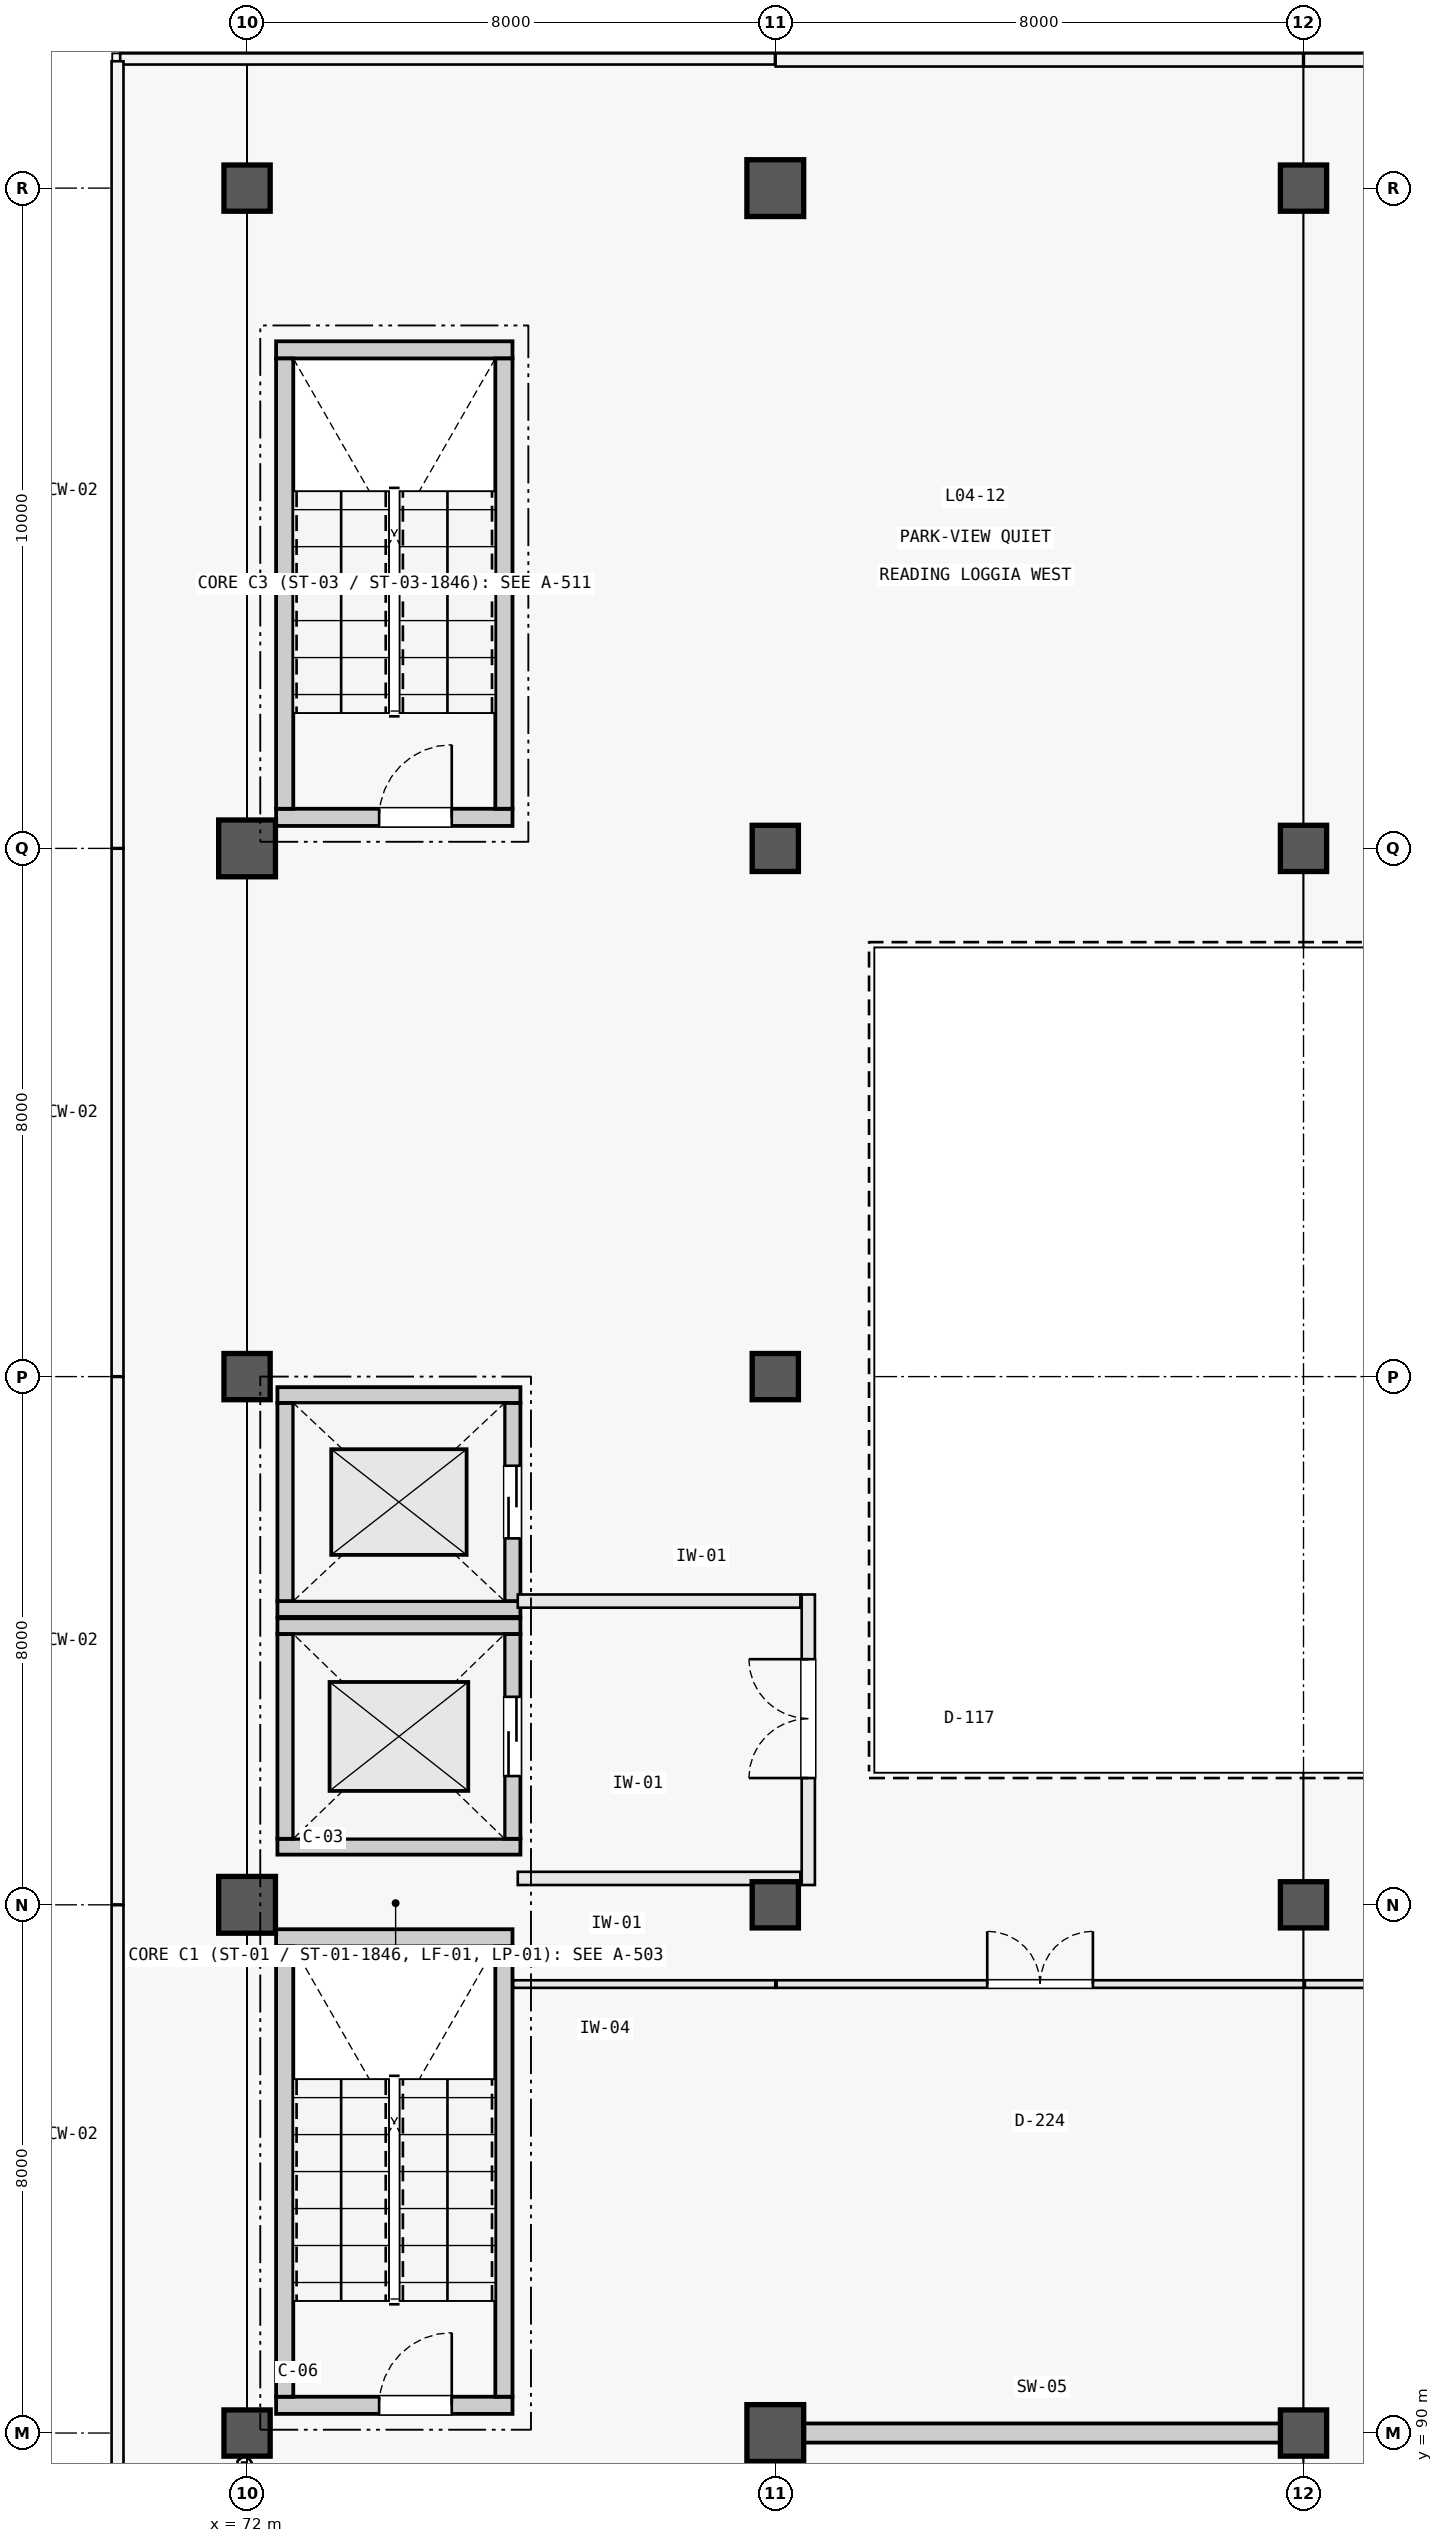
"""IFC4 building model, lengths in metres.
Left out: names, types, materials, properties, quantities, classifications, styles, units other than length and angle.
Written with IfcOpenShell. Run it as: python <this file> out.ifc"""

import sys

from ifc_helpers import new_model, si_unit, direction, frame, frame_2d, origin, origin_2d, place, context, subcontext, project, spatial, rectangle, extrude, element, fill, save


model = new_model("IFC4")
c1 = context("Model", 3, precision=1e-05, world=origin(), true_north=direction((0.0, 1.0)))
c2 = subcontext(c1, "Body", "Model", "MODEL_VIEW")
j1 = project(units=[si_unit("LENGTHUNIT", "METRE"), si_unit("PLANEANGLEUNIT", "RADIAN")], contexts=[c1])
p1 = place(None, origin())
s1 = spatial("IfcSite", under=j1, at=p1, CompositionType="ELEMENT")
p2 = place(p1, origin())
s2 = spatial("IfcBuilding", under=s1, at=p2, CompositionType="ELEMENT")
p3 = place(p2, frame((0.0, 0.0, 15.3)))
s3 = spatial("IfcBuildingStorey", under=s2, at=p3, CompositionType="ELEMENT", Elevation=15.3)
p4 = place(p3, frame((72.0, 90.0, 0.0), z_axis=(0.0, 0.0, 1.0), x_axis=(1.0, 0.0, 0.0)))
e1 = element("IfcColumn", 1, at=p4, inside=s3, PredefinedType="COLUMN", context=c2, shape_type="SweptSolid", body=[
    extrude(rectangle(XDim=0.7, YDim=0.7, at=origin_2d()), origin(), (0.0, 0.0, 1.0), 4.8),
])
p5 = place(p3, frame((72.0, 98.0, 0.0), z_axis=(0.0, 0.0, 1.0), x_axis=(1.0, 0.0, 0.0)))
e2 = element("IfcColumn", 2, at=p5, inside=s3, PredefinedType="COLUMN", context=c2, shape_type="SweptSolid", body=[
    extrude(rectangle(XDim=0.86, YDim=0.86, at=origin_2d()), origin(), (0.0, 0.0, 1.0), 4.8),
])
p6 = place(p3, frame((72.0, 106.0, 0.0), z_axis=(0.0, 0.0, 1.0), x_axis=(1.0, 0.0, 0.0)))
e3 = element("IfcColumn", 3, at=p6, inside=s3, PredefinedType="COLUMN", context=c2, shape_type="SweptSolid", body=[
    extrude(rectangle(XDim=0.7, YDim=0.7, at=origin_2d()), origin(), (0.0, 0.0, 1.0), 4.8),
])
p7 = place(p3, frame((72.0, 114.0, 0.0), z_axis=(0.0, 0.0, 1.0), x_axis=(1.0, 0.0, 0.0)))
e4 = element("IfcColumn", 4, at=p7, inside=s3, PredefinedType="COLUMN", context=c2, shape_type="SweptSolid", body=[
    extrude(rectangle(XDim=0.86, YDim=0.86, at=origin_2d()), origin(), (0.0, 0.0, 1.0), 4.8),
])
p8 = place(p3, frame((72.0, 124.0, 0.0), z_axis=(0.0, 0.0, 1.0), x_axis=(1.0, 0.0, 0.0)))
e5 = element("IfcColumn", 5, at=p8, inside=s3, PredefinedType="COLUMN", context=c2, shape_type="SweptSolid", body=[
    extrude(rectangle(XDim=0.7, YDim=0.7, at=origin_2d()), origin(), (0.0, 0.0, 1.0), 4.8),
])
p9 = place(p3, frame((80.0, 90.0, 0.0), z_axis=(0.0, 0.0, 1.0), x_axis=(1.0, 0.0, 0.0)))
e6 = element("IfcColumn", 6, at=p9, inside=s3, PredefinedType="COLUMN", context=c2, shape_type="SweptSolid", body=[
    extrude(rectangle(XDim=0.86, YDim=0.86, at=origin_2d()), origin(), (0.0, 0.0, 1.0), 4.8),
])
for number, where, z_axis, x_axis in (
    (7, (80.0, 98.0, 0.0), (0.0, 0.0, 1.0), (1.0, 0.0, 0.0)),
    (8, (80.0, 106.0, 0.0), (0.0, 0.0, 1.0), (1.0, 0.0, 0.0)),
    (9, (80.0, 114.0, 0.0), (0.0, 0.0, 1.0), (1.0, 0.0, 0.0)),
):
    element("IfcColumn", number, at=place(p3, frame(where, z_axis=z_axis, x_axis=x_axis)), inside=s3, PredefinedType="COLUMN", context=c2, shape_type="SweptSolid", body=[
        extrude(rectangle(XDim=0.7, YDim=0.7, at=origin_2d()), origin(), (0.0, 0.0, 1.0), 4.8),
    ])
p10 = place(p3, frame((80.0, 124.0, 0.0), z_axis=(0.0, 0.0, 1.0), x_axis=(1.0, 0.0, 0.0)))
e10 = element("IfcColumn", 10, at=p10, inside=s3, PredefinedType="COLUMN", context=c2, shape_type="SweptSolid", body=[
    extrude(rectangle(XDim=0.86, YDim=0.86, at=origin_2d()), origin(), (0.0, 0.0, 1.0), 4.8),
])
for number, where, z_axis, x_axis in (
    (11, (88.0, 90.0, 0.0), (0.0, 0.0, 1.0), (1.0, 0.0, 0.0)),
    (12, (88.0, 98.0, 0.0), (0.0, 0.0, 1.0), (1.0, 0.0, 0.0)),
    (13, (88.0, 114.0, 0.0), (0.0, 0.0, 1.0), (1.0, 0.0, 0.0)),
    (14, (88.0, 124.0, 0.0), (0.0, 0.0, 1.0), (1.0, 0.0, 0.0)),
):
    element("IfcColumn", number, at=place(p3, frame(where, z_axis=z_axis, x_axis=x_axis)), inside=s3, PredefinedType="COLUMN", context=c2, shape_type="SweptSolid", body=[
        extrude(rectangle(XDim=0.7, YDim=0.7, at=origin_2d()), origin(), (0.0, 0.0, 1.0), 4.8),
    ])
p11 = place(p3, frame((80.43, 90.0, 0.0), z_axis=(0.0, 0.0, 1.0), x_axis=(1.0, 0.0, 0.0)))
e15 = element("IfcWall", 15, at=p11, inside=s3, PredefinedType="SHEAR", context=c2, shape_type="SweptSolid", body=[
    extrude(rectangle(XDim=7.22, YDim=0.29, at=frame_2d((3.61, 0.0))), origin(), (0.0, 0.0, 1.0), 4.52),
])
p12 = place(p3, frame((72.44, 90.42, 0.0), z_axis=(0.0, 0.0, 1.0), x_axis=(1.0, 0.0, 0.0)))
e16 = element("IfcWall", 16, at=p12, inside=s3, PredefinedType="SOLIDWALL", context=c2, shape_type="SweptSolid", body=[
    extrude(rectangle(XDim=3.58, YDim=0.26, at=frame_2d((1.79, 0.0))), origin(), (0.0, 0.0, 1.0), 4.8),
])
p13 = place(p12, frame((1.56, 0.0, 0.0)))
e17 = element("IfcOpeningElement", 17, at=p13, cuts=e16, PredefinedType="OPENING", context=c2, shape_type="SweptSolid", body=[
    extrude(rectangle(XDim=1.1, YDim=2.2, at=frame_2d((0.55, 1.1))), frame((0.0, 0.142, 0.0), z_axis=(0.0, -1.0, 0.0), x_axis=(1.0, 0.0, 0.0)), (0.0, 0.0, 1.0), 0.284),
])
p14 = place(p3, frame((72.44, 97.5, 0.0), z_axis=(0.0, 0.0, 1.0), x_axis=(1.0, 0.0, 0.0)))
e18 = element("IfcWall", 18, at=p14, inside=s3, PredefinedType="SOLIDWALL", context=c2, shape_type="SweptSolid", body=[
    extrude(rectangle(XDim=3.58, YDim=0.26, at=frame_2d((1.79, 0.0))), origin(), (0.0, 0.0, 1.0), 4.8),
])
for number, where, z_axis, x_axis in (
    (19, (72.57, 90.55, 0.0), (0.0, 0.0, 1.0), (0.0, 1.0, 0.0)),
    (20, (75.89, 90.55, 0.0), (0.0, 0.0, 1.0), (0.0, 1.0, 0.0)),
):
    element("IfcWall", number, at=place(p3, frame(where, z_axis=z_axis, x_axis=x_axis)), inside=s3, PredefinedType="SOLIDWALL", context=c2, shape_type="SweptSolid", body=[
        extrude(rectangle(XDim=6.82, YDim=0.26, at=frame_2d((3.41, 0.0))), origin(), (0.0, 0.0, 1.0), 4.8),
    ])
p15 = place(p3, frame((72.44, 114.47, 0.0), z_axis=(0.0, 0.0, 1.0), x_axis=(1.0, 0.0, 0.0)))
e21 = element("IfcWall", 21, at=p15, inside=s3, PredefinedType="SOLIDWALL", context=c2, shape_type="SweptSolid", body=[
    extrude(rectangle(XDim=3.58, YDim=0.26, at=frame_2d((1.79, 0.0))), origin(), (0.0, 0.0, 1.0), 4.8),
])
p16 = place(p15, frame((1.56, 0.0, 0.0)))
e22 = element("IfcOpeningElement", 22, at=p16, cuts=e21, PredefinedType="OPENING", context=c2, shape_type="SweptSolid", body=[
    extrude(rectangle(XDim=1.1, YDim=2.2, at=frame_2d((0.55, 1.1))), frame((0.0, 0.142, 0.0), z_axis=(0.0, -1.0, 0.0), x_axis=(1.0, 0.0, 0.0)), (0.0, 0.0, 1.0), 0.284),
])
p17 = place(p3, frame((72.44, 121.55, 0.0), z_axis=(0.0, 0.0, 1.0), x_axis=(1.0, 0.0, 0.0)))
e23 = element("IfcWall", 23, at=p17, inside=s3, PredefinedType="SOLIDWALL", context=c2, shape_type="SweptSolid", body=[
    extrude(rectangle(XDim=3.58, YDim=0.26, at=frame_2d((1.79, 0.0))), origin(), (0.0, 0.0, 1.0), 4.8),
])
for number, where, z_axis, x_axis in (
    (24, (72.57, 114.6, 0.0), (0.0, 0.0, 1.0), (0.0, 1.0, 0.0)),
    (25, (75.89, 114.6, 0.0), (0.0, 0.0, 1.0), (0.0, 1.0, 0.0)),
):
    element("IfcWall", number, at=place(p3, frame(where, z_axis=z_axis, x_axis=x_axis)), inside=s3, PredefinedType="SOLIDWALL", context=c2, shape_type="SweptSolid", body=[
        extrude(rectangle(XDim=6.82, YDim=0.26, at=frame_2d((3.41, 0.0))), origin(), (0.0, 0.0, 1.0), 4.8),
    ])
for number, where, z_axis, x_axis in (
    (26, (72.46, 98.88, 0.0), (0.0, 0.0, 1.0), (1.0, 0.0, 0.0)),
    (27, (72.46, 102.22, 0.0), (0.0, 0.0, 1.0), (1.0, 0.0, 0.0)),
):
    element("IfcWall", number, at=place(p3, frame(where, z_axis=z_axis, x_axis=x_axis)), inside=s3, PredefinedType="SOLIDWALL", context=c2, shape_type="SweptSolid", body=[
        extrude(rectangle(XDim=3.68, YDim=0.24, at=frame_2d((1.84, 0.0))), origin(), (0.0, 0.0, 1.0), 4.8),
    ])
p18 = place(p3, frame((72.58, 99.0, 0.0), z_axis=(0.0, 0.0, 1.0), x_axis=(0.0, 1.0, 0.0)))
e28 = element("IfcWall", 28, at=p18, inside=s3, PredefinedType="SOLIDWALL", context=c2, shape_type="SweptSolid", body=[
    extrude(rectangle(XDim=3.1, YDim=0.24, at=frame_2d((1.55, 0.0))), origin(), (0.0, 0.0, 1.0), 4.8),
])
p19 = place(p3, frame((76.02, 99.0, 0.0), z_axis=(0.0, 0.0, 1.0), x_axis=(0.0, 1.0, 0.0)))
e29 = element("IfcWall", 29, at=p19, inside=s3, PredefinedType="SOLIDWALL", context=c2, shape_type="SweptSolid", body=[
    extrude(rectangle(XDim=3.1, YDim=0.24, at=frame_2d((1.55, 0.0))), origin(), (0.0, 0.0, 1.0), 4.8),
])
p20 = place(p19, frame((0.95, 0.0, 0.0)))
e30 = element("IfcOpeningElement", 30, at=p20, cuts=e29, PredefinedType="OPENING", context=c2, shape_type="SweptSolid", body=[
    extrude(rectangle(XDim=1.2, YDim=2.2, at=frame_2d((0.6, 1.1))), frame((0.0, 0.132, 0.0), z_axis=(0.0, -1.0, 0.0), x_axis=(1.0, 0.0, 0.0)), (0.0, 0.0, 1.0), 0.264),
])
for number, where, z_axis, x_axis in (
    (31, (72.46, 102.48, 0.0), (0.0, 0.0, 1.0), (1.0, 0.0, 0.0)),
    (32, (72.46, 105.72, 0.0), (0.0, 0.0, 1.0), (1.0, 0.0, 0.0)),
):
    element("IfcWall", number, at=place(p3, frame(where, z_axis=z_axis, x_axis=x_axis)), inside=s3, PredefinedType="SOLIDWALL", context=c2, shape_type="SweptSolid", body=[
        extrude(rectangle(XDim=3.68, YDim=0.24, at=frame_2d((1.84, 0.0))), origin(), (0.0, 0.0, 1.0), 4.8),
    ])
p21 = place(p3, frame((72.58, 102.6, 0.0), z_axis=(0.0, 0.0, 1.0), x_axis=(0.0, 1.0, 0.0)))
e33 = element("IfcWall", 33, at=p21, inside=s3, PredefinedType="SOLIDWALL", context=c2, shape_type="SweptSolid", body=[
    extrude(rectangle(XDim=3.0, YDim=0.24, at=frame_2d((1.5, 0.0))), origin(), (0.0, 0.0, 1.0), 4.8),
])
p22 = place(p3, frame((76.02, 102.6, 0.0), z_axis=(0.0, 0.0, 1.0), x_axis=(0.0, 1.0, 0.0)))
e34 = element("IfcWall", 34, at=p22, inside=s3, PredefinedType="SOLIDWALL", context=c2, shape_type="SweptSolid", body=[
    extrude(rectangle(XDim=3.0, YDim=0.24, at=frame_2d((1.5, 0.0))), origin(), (0.0, 0.0, 1.0), 4.8),
])
p23 = place(p22, frame((0.95, 0.0, 0.0)))
e35 = element("IfcOpeningElement", 35, at=p23, cuts=e34, PredefinedType="OPENING", context=c2, shape_type="SweptSolid", body=[
    extrude(rectangle(XDim=1.1, YDim=2.2, at=frame_2d((0.55, 1.1))), frame((0.0, 0.132, 0.0), z_axis=(0.0, -1.0, 0.0), x_axis=(1.0, 0.0, 0.0)), (0.0, 0.0, 1.0), 0.264),
])
for number, where, z_axis, x_axis in (
    (36, (76.1, 98.4, 0.0), (0.0, 0.0, 1.0), (1.0, 0.0, 0.0)),
    (37, (76.1, 102.6, 0.0), (0.0, 0.0, 1.0), (1.0, 0.0, 0.0)),
):
    element("IfcWall", number, at=place(p3, frame(where, z_axis=z_axis, x_axis=x_axis)), inside=s3, PredefinedType="PARTITIONING", context=c2, shape_type="SweptSolid", body=[
        extrude(rectangle(XDim=4.28, YDim=0.2, at=frame_2d((2.14, 0.0))), origin(), (0.0, 0.0, 1.0), 3.54),
    ])
p24 = place(p3, frame((80.5, 98.3, 0.0), z_axis=(0.0, 0.0, 1.0), x_axis=(0.0, 1.0, 0.0)))
e38 = element("IfcWall", 38, at=p24, inside=s3, PredefinedType="PARTITIONING", context=c2, shape_type="SweptSolid", body=[
    extrude(rectangle(XDim=4.4, YDim=0.2, at=frame_2d((2.2, 0.0))), origin(), (0.0, 0.0, 1.0), 3.54),
])
p25 = place(p24, frame((1.62, 0.0, 0.0)))
e39 = element("IfcOpeningElement", 39, at=p25, cuts=e38, PredefinedType="OPENING", context=c2, shape_type="SweptSolid", body=[
    extrude(rectangle(XDim=1.8, YDim=2.25, at=frame_2d((0.9, 1.125))), frame((0.0, 0.112, 0.0), z_axis=(0.0, -1.0, 0.0), x_axis=(1.0, 0.0, 0.0)), (0.0, 0.0, 1.0), 0.224),
])
p26 = place(p3, frame((76.03, 96.8, 0.0), z_axis=(0.0, 0.0, 1.0), x_axis=(1.0, 0.0, 0.0)))
e40 = element("IfcWall", 40, at=p26, inside=s3, PredefinedType="PARTITIONING", context=c2, shape_type="SweptSolid", body=[
    extrude(rectangle(XDim=3.97, YDim=0.115, at=frame_2d((1.985, 0.0))), origin(), (0.0, 0.0, 1.0), 3.37),
])
p27 = place(p3, frame((80.02, 96.8, 0.0), z_axis=(0.0, 0.0, 1.0), x_axis=(1.0, 0.0, 0.0)))
e41 = element("IfcWall", 41, at=p27, inside=s3, PredefinedType="PARTITIONING", context=c2, shape_type="SweptSolid", body=[
    extrude(rectangle(XDim=7.98, YDim=0.115, at=frame_2d((3.99, 0.0))), origin(), (0.0, 0.0, 1.0), 3.37),
])
p28 = place(p27, frame((3.19, 0.0, 0.0)))
e42 = element("IfcOpeningElement", 42, at=p28, cuts=e41, PredefinedType="OPENING", context=c2, shape_type="SweptSolid", body=[
    extrude(rectangle(XDim=1.6, YDim=2.2, at=frame_2d((0.8, 1.1))), frame((0.0, 0.069, 0.0), z_axis=(0.0, -1.0, 0.0), x_axis=(1.0, 0.0, 0.0)), (0.0, 0.0, 1.0), 0.139),
])
p29 = place(p3, frame((88.02, 96.8, 0.0), z_axis=(0.0, 0.0, 1.0), x_axis=(1.0, 0.0, 0.0)))
e43 = element("IfcWall", 43, at=p29, inside=s3, PredefinedType="PARTITIONING", context=c2, shape_type="SweptSolid", body=[
    extrude(rectangle(XDim=7.98, YDim=0.115, at=frame_2d((3.99, 0.0))), origin(), (0.0, 0.0, 1.0), 3.37),
])
p30 = place(p29, frame((3.515, 0.0, 0.0)))
e44 = element("IfcOpeningElement", 44, at=p30, cuts=e43, PredefinedType="OPENING", context=c2, shape_type="SweptSolid", body=[
    extrude(rectangle(XDim=0.95, YDim=2.15, at=frame_2d((0.475, 1.075))), frame((0.0, 0.069, 0.0), z_axis=(0.0, -1.0, 0.0), x_axis=(1.0, 0.0, 0.0)), (0.0, 0.0, 1.0), 0.139),
])
p31 = place(p13, origin())
e45 = element("IfcDoor", 45, at=p31, inside=s3, OperationType="SINGLE_SWING_RIGHT", PredefinedType="DOOR", context=c2, shape_type="SweptSolid", body=[
    extrude(rectangle(XDim=1.1, YDim=2.2, at=frame_2d((0.55, 1.1))), frame((0.0, 0.025, 0.0), z_axis=(0.0, -1.0, 0.0), x_axis=(1.0, 0.0, 0.0)), (0.0, 0.0, 1.0), 0.05),
])
fill(e17, e45)
p32 = place(p16, origin())
e46 = element("IfcDoor", 46, at=p32, inside=s3, OperationType="SINGLE_SWING_RIGHT", PredefinedType="DOOR", context=c2, shape_type="SweptSolid", body=[
    extrude(rectangle(XDim=1.1, YDim=2.2, at=frame_2d((0.55, 1.1))), frame((0.0, 0.025, 0.0), z_axis=(0.0, -1.0, 0.0), x_axis=(1.0, 0.0, 0.0)), (0.0, 0.0, 1.0), 0.05),
])
fill(e22, e46)
p33 = place(p20, origin())
e47 = element("IfcDoor", 47, at=p33, inside=s3, OperationType="DOUBLE_DOOR_SLIDING", PredefinedType="DOOR", context=c2, shape_type="SweptSolid", body=[
    extrude(rectangle(XDim=1.2, YDim=2.2, at=frame_2d((0.6, 1.1))), frame((0.0, 0.025, 0.0), z_axis=(0.0, -1.0, 0.0), x_axis=(1.0, 0.0, 0.0)), (0.0, 0.0, 1.0), 0.05),
])
fill(e30, e47)
p34 = place(p23, origin())
e48 = element("IfcDoor", 48, at=p34, inside=s3, OperationType="DOUBLE_DOOR_SLIDING", PredefinedType="DOOR", context=c2, shape_type="SweptSolid", body=[
    extrude(rectangle(XDim=1.1, YDim=2.2, at=frame_2d((0.55, 1.1))), frame((0.0, 0.025, 0.0), z_axis=(0.0, -1.0, 0.0), x_axis=(1.0, 0.0, 0.0)), (0.0, 0.0, 1.0), 0.05),
])
fill(e35, e48)
p35 = place(p25, origin())
e49 = element("IfcDoor", 49, at=p35, inside=s3, OperationType="DOUBLE_DOOR_SINGLE_SWING", PredefinedType="DOOR", context=c2, shape_type="SweptSolid", body=[
    extrude(rectangle(XDim=1.8, YDim=2.25, at=frame_2d((0.9, 1.125))), frame((0.0, 0.025, 0.0), z_axis=(0.0, -1.0, 0.0), x_axis=(1.0, 0.0, 0.0)), (0.0, 0.0, 1.0), 0.05),
])
fill(e39, e49)
p36 = place(p28, origin())
e50 = element("IfcDoor", 50, at=p36, inside=s3, OperationType="DOUBLE_DOOR_SINGLE_SWING", PredefinedType="DOOR", context=c2, shape_type="SweptSolid", body=[
    extrude(rectangle(XDim=1.6, YDim=2.2, at=frame_2d((0.8, 1.1))), frame((0.0, 0.025, 0.0), z_axis=(0.0, -1.0, 0.0), x_axis=(1.0, 0.0, 0.0)), (0.0, 0.0, 1.0), 0.05),
])
fill(e42, e50)
save(model, sys.argv[1])
